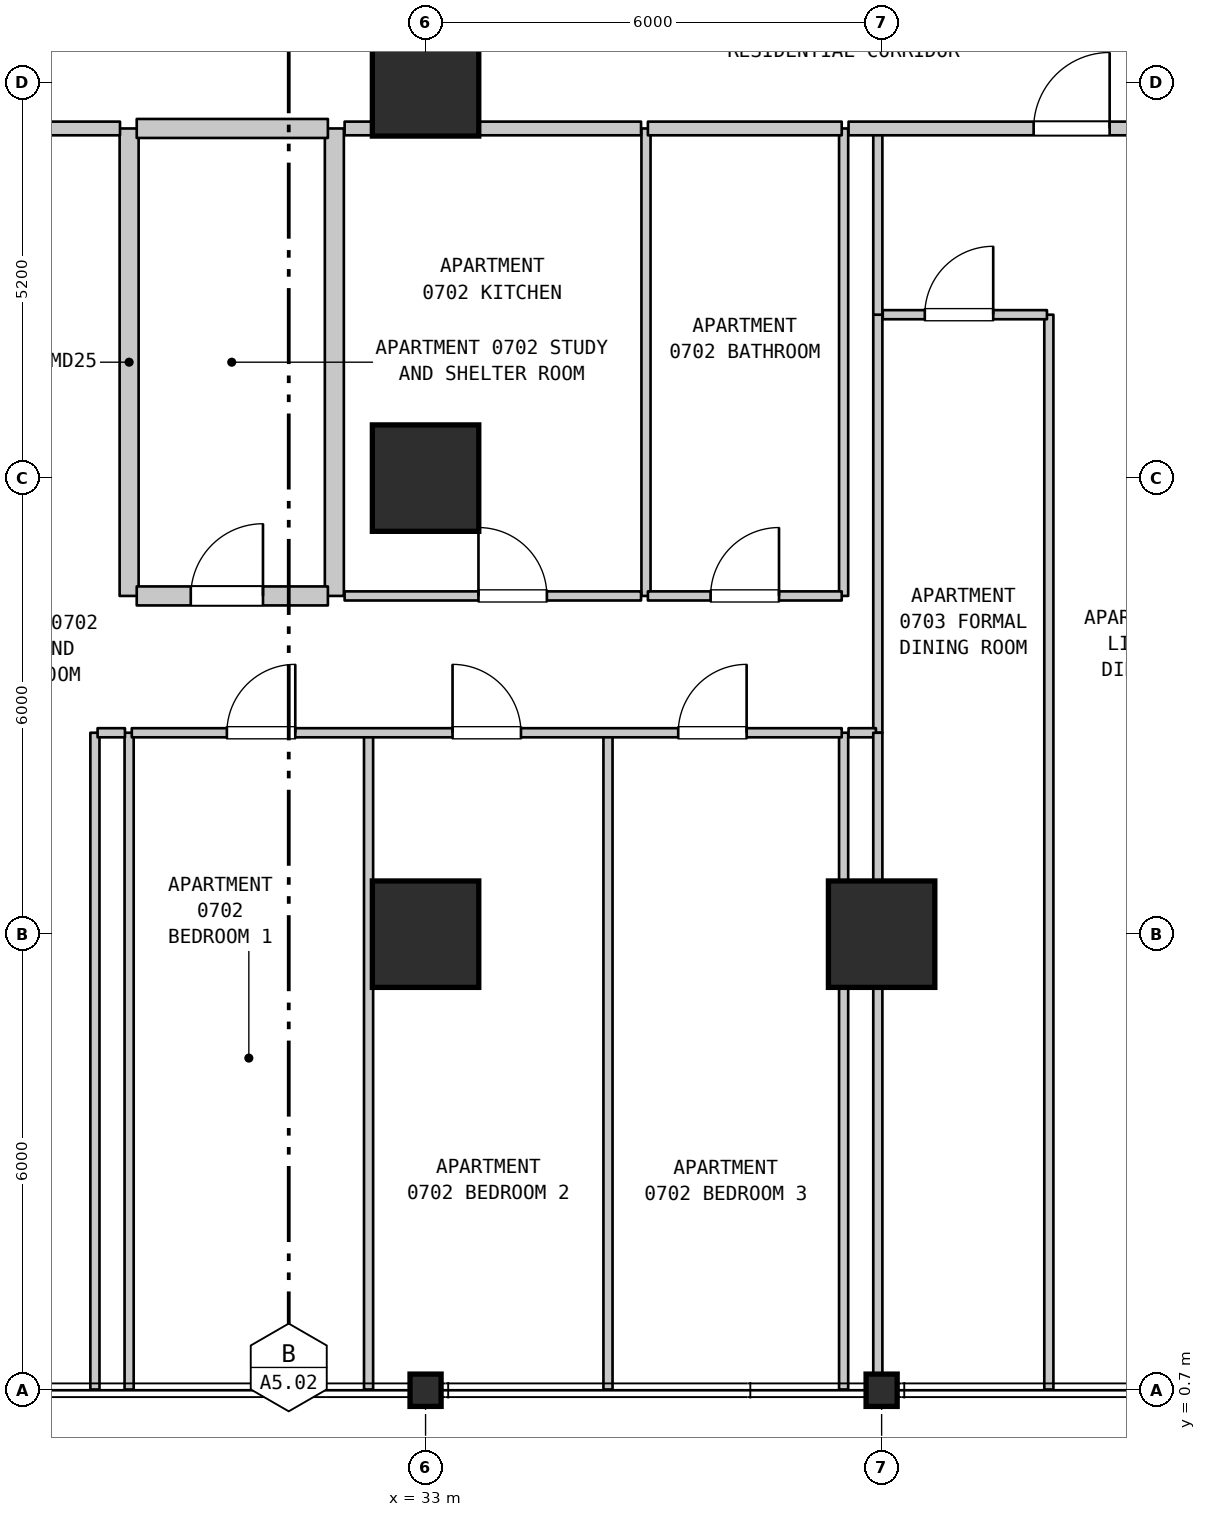
"""IFC4 building model, lengths in metres.
Left out: names, types, materials, properties, quantities, classifications, styles, units other than length and angle.
Written with IfcOpenShell. Run it as: python <this file> out.ifc"""

import sys

from ifc_helpers import new_model, si_unit, direction, frame, frame_2d, origin, origin_2d, place, context, subcontext, project, spatial, rectangle, i_section, extrude, element, fill, save


model = new_model("IFC4")
c1 = context("Model", 3, precision=1e-05, world=origin(), true_north=direction((0.0, 1.0)))
c2 = subcontext(c1, "Body", "Model", "MODEL_VIEW")
j1 = project(units=[si_unit("LENGTHUNIT", "METRE"), si_unit("PLANEANGLEUNIT", "RADIAN")], contexts=[c1])
p1 = place(None, origin())
s1 = spatial("IfcSite", under=j1, at=p1, CompositionType="ELEMENT")
p2 = place(p1, origin())
s2 = spatial("IfcBuilding", under=s1, at=p2, CompositionType="ELEMENT")
p3 = place(p2, frame((0.0, 0.0, 35.1)))
s3 = spatial("IfcBuildingStorey", under=s2, at=p3, CompositionType="ELEMENT", Elevation=35.1)
p4 = place(p3, frame((33.0, 0.7, 0.0), z_axis=(0.0, 0.0, 1.0), x_axis=(1.0, 0.0, 0.0)))
e1 = element("IfcColumn", 1, at=p4, inside=s3, PredefinedType="COLUMN", context=c2, shape_type="SweptSolid", body=[
    extrude(i_section(OverallWidth=0.409, OverallDepth=0.425, WebThickness=0.032, FlangeThickness=0.052, FilletRadius=0.015, at=origin_2d()), origin(), (0.0, 0.0, 1.0), 3.7),
])
for number, where, z_axis, x_axis in (
    (2, (33.0, 6.7, 0.0), (0.0, 0.0, 1.0), (1.0, 0.0, 0.0)),
    (3, (33.0, 12.7, 0.0), (0.0, 0.0, 1.0), (1.0, 0.0, 0.0)),
    (4, (33.0, 17.9, 0.0), (0.0, 0.0, 1.0), (1.0, 0.0, 0.0)),
):
    element("IfcColumn", number, at=place(p3, frame(where, z_axis=z_axis, x_axis=x_axis)), inside=s3, PredefinedType="COLUMN", context=c2, shape_type="SweptSolid", body=[
        extrude(rectangle(XDim=1.4, YDim=1.4, at=origin_2d()), origin(), (0.0, 0.0, 1.0), 3.7),
    ])
p5 = place(p3, frame((39.0, 0.7, 0.0), z_axis=(0.0, 0.0, 1.0), x_axis=(1.0, 0.0, 0.0)))
e5 = element("IfcColumn", 5, at=p5, inside=s3, PredefinedType="COLUMN", context=c2, shape_type="SweptSolid", body=[
    extrude(i_section(OverallWidth=0.409, OverallDepth=0.425, WebThickness=0.032, FlangeThickness=0.052, FilletRadius=0.015, at=origin_2d()), origin(), (0.0, 0.0, 1.0), 3.7),
])
p6 = place(p3, frame((39.0, 6.7, 0.0), z_axis=(0.0, 0.0, 1.0), x_axis=(1.0, 0.0, 0.0)))
e6 = element("IfcColumn", 6, at=p6, inside=s3, PredefinedType="COLUMN", context=c2, shape_type="SweptSolid", body=[
    extrude(rectangle(XDim=1.4, YDim=1.4, at=origin_2d()), origin(), (0.0, 0.0, 1.0), 3.7),
])
for number, where, z_axis, x_axis in (
    (7, (28.65, 0.71, 0.0), (0.0, 0.0, 1.0), (0.0, 1.0, 0.0)),
    (8, (29.1, 0.71, 0.0), (0.0, 0.0, 1.0), (0.0, 1.0, 0.0)),
):
    element("IfcWall", number, at=place(p3, frame(where, z_axis=z_axis, x_axis=x_axis)), inside=s3, PredefinedType="PARTITIONING", context=c2, shape_type="SweptSolid", body=[
        extrude(rectangle(XDim=8.64, YDim=0.12, at=frame_2d((4.32, 0.0))), origin(), (0.0, 0.0, 1.0), 3.385),
    ])
for number, where, z_axis, x_axis in (
    (9, (29.1, 11.15, 0.0), (0.0, 0.0, 1.0), (0.0, 1.0, 0.0)),
    (10, (31.8, 11.15, 0.0), (0.0, 0.0, 1.0), (0.0, 1.0, 0.0)),
):
    element("IfcWall", number, at=place(p3, frame(where, z_axis=z_axis, x_axis=x_axis)), inside=s3, PredefinedType="STANDARD", context=c2, shape_type="SweptSolid", body=[
        extrude(rectangle(XDim=6.15, YDim=0.25, at=frame_2d((3.075, 0.0))), origin(), (0.0, 0.0, 1.0), 3.385),
    ])
for number, where, z_axis, x_axis in (
    (11, (32.25, 0.71, 0.0), (0.0, 0.0, 1.0), (0.0, 1.0, 0.0)),
    (12, (35.4, 0.71, 0.0), (0.0, 0.0, 1.0), (0.0, 1.0, 0.0)),
):
    element("IfcWall", number, at=place(p3, frame(where, z_axis=z_axis, x_axis=x_axis)), inside=s3, PredefinedType="PARTITIONING", context=c2, shape_type="SweptSolid", body=[
        extrude(rectangle(XDim=8.64, YDim=0.12, at=frame_2d((4.32, 0.0))), origin(), (0.0, 0.0, 1.0), 3.385),
    ])
p7 = place(p3, frame((35.9, 11.15, 0.0), z_axis=(0.0, 0.0, 1.0), x_axis=(0.0, 1.0, 0.0)))
e13 = element("IfcWall", 13, at=p7, inside=s3, PredefinedType="PARTITIONING", context=c2, shape_type="SweptSolid", body=[
    extrude(rectangle(XDim=6.15, YDim=0.12, at=frame_2d((3.075, 0.0))), origin(), (0.0, 0.0, 1.0), 3.385),
])
p8 = place(p3, frame((38.5, 0.71, 0.0), z_axis=(0.0, 0.0, 1.0), x_axis=(0.0, 1.0, 0.0)))
e14 = element("IfcWall", 14, at=p8, inside=s3, PredefinedType="PARTITIONING", context=c2, shape_type="SweptSolid", body=[
    extrude(rectangle(XDim=8.64, YDim=0.12, at=frame_2d((4.32, 0.0))), origin(), (0.0, 0.0, 1.0), 3.385),
])
p9 = place(p3, frame((38.5, 11.15, 0.0), z_axis=(0.0, 0.0, 1.0), x_axis=(0.0, 1.0, 0.0)))
e15 = element("IfcWall", 15, at=p9, inside=s3, PredefinedType="PARTITIONING", context=c2, shape_type="SweptSolid", body=[
    extrude(rectangle(XDim=6.15, YDim=0.12, at=frame_2d((3.075, 0.0))), origin(), (0.0, 0.0, 1.0), 3.385),
])
p10 = place(p3, frame((38.95, 0.71, 0.0), z_axis=(0.0, 0.0, 1.0), x_axis=(0.0, 1.0, 0.0)))
e16 = element("IfcWall", 16, at=p10, inside=s3, PredefinedType="PARTITIONING", context=c2, shape_type="SweptSolid", body=[
    extrude(rectangle(XDim=5.99, YDim=0.12, at=frame_2d((2.995, 0.0))), origin(), (0.0, 0.0, 1.0), 2.885),
])
p11 = place(p3, frame((38.95, 9.35, 0.0), z_axis=(0.0, 0.0, 1.0), x_axis=(0.0, 1.0, 0.0)))
e17 = element("IfcWall", 17, at=p11, inside=s3, PredefinedType="PARTITIONING", context=c2, shape_type="SweptSolid", body=[
    extrude(rectangle(XDim=5.5, YDim=0.12, at=frame_2d((2.75, 0.0))), origin(), (0.0, 0.0, 1.0), 3.385),
])
p12 = place(p3, frame((38.95, 14.85, 0.0), z_axis=(0.0, 0.0, 1.0), x_axis=(0.0, 1.0, 0.0)))
e18 = element("IfcWall", 18, at=p12, inside=s3, PredefinedType="PARTITIONING", context=c2, shape_type="SweptSolid", body=[
    extrude(rectangle(XDim=2.45, YDim=0.12, at=frame_2d((1.225, 0.0))), origin(), (0.0, 0.0, 1.0), 3.385),
])
p13 = place(p3, frame((41.2, 0.71, 0.0), z_axis=(0.0, 0.0, 1.0), x_axis=(0.0, 1.0, 0.0)))
e19 = element("IfcWall", 19, at=p13, inside=s3, PredefinedType="PARTITIONING", context=c2, shape_type="SweptSolid", body=[
    extrude(rectangle(XDim=14.14, YDim=0.12, at=frame_2d((7.07, 0.0))), origin(), (0.0, 0.0, 1.0), 3.385),
])
p14 = place(p3, frame((28.685, 9.35, 0.0), z_axis=(0.0, 0.0, 1.0), x_axis=(1.0, 0.0, 0.0)))
e20 = element("IfcWall", 20, at=p14, inside=s3, PredefinedType="PARTITIONING", context=c2, shape_type="SweptSolid", body=[
    extrude(rectangle(XDim=0.36, YDim=0.12, at=frame_2d((0.18, 0.0))), origin(), (0.0, 0.0, 1.0), 3.385),
])
p15 = place(p3, frame((29.135, 9.35, 0.0), z_axis=(0.0, 0.0, 1.0), x_axis=(1.0, 0.0, 0.0)))
e21 = element("IfcWall", 21, at=p15, inside=s3, PredefinedType="PARTITIONING", context=c2, shape_type="SweptSolid", body=[
    extrude(rectangle(XDim=9.34, YDim=0.12, at=frame_2d((4.67, 0.0))), origin(), (0.0, 0.0, 1.0), 3.385),
])
p16 = place(p15, frame((1.251, 0.0, 0.0)))
e22 = element("IfcOpeningElement", 22, at=p16, cuts=e21, PredefinedType="OPENING", context=c2, shape_type="SweptSolid", body=[
    extrude(rectangle(XDim=0.9, YDim=2.15, at=frame_2d((0.45, 1.075))), frame((0.0, 0.07, 0.0), z_axis=(0.0, -1.0, 0.0), x_axis=(1.0, 0.0, 0.0)), (0.0, 0.0, 1.0), 0.14),
])
p17 = place(p15, frame((4.22, 0.0, 0.0)))
e23 = element("IfcOpeningElement", 23, at=p17, cuts=e21, PredefinedType="OPENING", context=c2, shape_type="SweptSolid", body=[
    extrude(rectangle(XDim=0.9, YDim=2.15, at=frame_2d((0.45, 1.075))), frame((0.0, 0.07, 0.0), z_axis=(0.0, -1.0, 0.0), x_axis=(1.0, 0.0, 0.0)), (0.0, 0.0, 1.0), 0.14),
])
p18 = place(p15, frame((7.189, 0.0, 0.0)))
e24 = element("IfcOpeningElement", 24, at=p18, cuts=e21, PredefinedType="OPENING", context=c2, shape_type="SweptSolid", body=[
    extrude(rectangle(XDim=0.9, YDim=2.15, at=frame_2d((0.45, 1.075))), frame((0.0, 0.07, 0.0), z_axis=(0.0, -1.0, 0.0), x_axis=(1.0, 0.0, 0.0)), (0.0, 0.0, 1.0), 0.14),
])
p19 = place(p3, frame((38.565, 9.35, 0.0), z_axis=(0.0, 0.0, 1.0), x_axis=(1.0, 0.0, 0.0)))
e25 = element("IfcWall", 25, at=p19, inside=s3, PredefinedType="PARTITIONING", context=c2, shape_type="SweptSolid", body=[
    extrude(rectangle(XDim=0.36, YDim=0.12, at=frame_2d((0.18, 0.0))), origin(), (0.0, 0.0, 1.0), 3.385),
])
p20 = place(p3, frame((29.2, 11.15, 0.0), z_axis=(0.0, 0.0, 1.0), x_axis=(1.0, 0.0, 0.0)))
e26 = element("IfcWall", 26, at=p20, inside=s3, PredefinedType="STANDARD", context=c2, shape_type="SweptSolid", body=[
    extrude(rectangle(XDim=2.515, YDim=0.25, at=frame_2d((1.258, 0.0))), origin(), (0.0, 0.0, 1.0), 3.385),
])
p21 = place(p20, frame((0.711, 0.0, 0.0)))
e27 = element("IfcOpeningElement", 27, at=p21, cuts=e26, PredefinedType="OPENING", context=c2, shape_type="SweptSolid", body=[
    extrude(rectangle(XDim=0.95, YDim=2.15, at=frame_2d((0.475, 1.075))), frame((0.0, 0.135, 0.0), z_axis=(0.0, -1.0, 0.0), x_axis=(1.0, 0.0, 0.0)), (0.0, 0.0, 1.0), 0.27),
])
p22 = place(p3, frame((31.935, 11.15, 0.0), z_axis=(0.0, 0.0, 1.0), x_axis=(1.0, 0.0, 0.0)))
e28 = element("IfcWall", 28, at=p22, inside=s3, PredefinedType="PARTITIONING", context=c2, shape_type="SweptSolid", body=[
    extrude(rectangle(XDim=3.9, YDim=0.12, at=frame_2d((1.95, 0.0))), origin(), (0.0, 0.0, 1.0), 3.385),
])
p23 = place(p22, frame((1.761, 0.0, 0.0)))
e29 = element("IfcOpeningElement", 29, at=p23, cuts=e28, PredefinedType="OPENING", context=c2, shape_type="SweptSolid", body=[
    extrude(rectangle(XDim=0.9, YDim=2.15, at=frame_2d((0.45, 1.075))), frame((0.0, 0.07, 0.0), z_axis=(0.0, -1.0, 0.0), x_axis=(1.0, 0.0, 0.0)), (0.0, 0.0, 1.0), 0.14),
])
p24 = place(p3, frame((35.925, 11.15, 0.0), z_axis=(0.0, 0.0, 1.0), x_axis=(1.0, 0.0, 0.0)))
e30 = element("IfcWall", 30, at=p24, inside=s3, PredefinedType="PARTITIONING", context=c2, shape_type="SweptSolid", body=[
    extrude(rectangle(XDim=2.55, YDim=0.12, at=frame_2d((1.275, 0.0))), origin(), (0.0, 0.0, 1.0), 3.385),
])
p25 = place(p24, frame((0.825, 0.0, 0.0)))
e31 = element("IfcOpeningElement", 31, at=p25, cuts=e30, PredefinedType="OPENING", context=c2, shape_type="SweptSolid", body=[
    extrude(rectangle(XDim=0.9, YDim=2.1, at=frame_2d((0.45, 1.05))), frame((0.0, 0.07, 0.0), z_axis=(0.0, -1.0, 0.0), x_axis=(1.0, 0.0, 0.0)), (0.0, 0.0, 1.0), 0.14),
])
p26 = place(p3, frame((39.015, 14.85, 0.0), z_axis=(0.0, 0.0, 1.0), x_axis=(1.0, 0.0, 0.0)))
e32 = element("IfcWall", 32, at=p26, inside=s3, PredefinedType="PARTITIONING", context=c2, shape_type="SweptSolid", body=[
    extrude(rectangle(XDim=2.16, YDim=0.12, at=frame_2d((1.08, 0.0))), origin(), (0.0, 0.0, 1.0), 3.385),
])
p27 = place(p26, frame((0.553, 0.0, 0.0)))
e33 = element("IfcOpeningElement", 33, at=p27, cuts=e32, PredefinedType="OPENING", context=c2, shape_type="SweptSolid", body=[
    extrude(rectangle(XDim=0.9, YDim=2.15, at=frame_2d((0.45, 1.075))), frame((0.0, 0.07, 0.0), z_axis=(0.0, -1.0, 0.0), x_axis=(1.0, 0.0, 0.0)), (0.0, 0.0, 1.0), 0.14),
])
p28 = place(p3, frame((23.885, 17.3, 0.0), z_axis=(0.0, 0.0, 1.0), x_axis=(1.0, 0.0, 0.0)))
e34 = element("IfcWall", 34, at=p28, inside=s3, PredefinedType="STANDARD", context=c2, shape_type="SweptSolid", body=[
    extrude(rectangle(XDim=5.095, YDim=0.18, at=frame_2d((2.547, 0.0))), origin(), (0.0, 0.0, 1.0), 3.385),
])
p29 = place(p28, frame((2.08, 0.0, 0.0)))
e35 = element("IfcOpeningElement", 35, at=p29, cuts=e34, PredefinedType="OPENING", context=c2, shape_type="SweptSolid", body=[
    extrude(rectangle(XDim=1.0, YDim=2.15, at=frame_2d((0.5, 1.075))), frame((0.0, 0.1, 0.0), z_axis=(0.0, -1.0, 0.0), x_axis=(1.0, 0.0, 0.0)), (0.0, 0.0, 1.0), 0.2),
])
p30 = place(p3, frame((29.2, 17.3, 0.0), z_axis=(0.0, 0.0, 1.0), x_axis=(1.0, 0.0, 0.0)))
e36 = element("IfcWall", 36, at=p30, inside=s3, PredefinedType="STANDARD", context=c2, shape_type="SweptSolid", body=[
    extrude(rectangle(XDim=2.515, YDim=0.25, at=frame_2d((1.258, 0.0))), origin(), (0.0, 0.0, 1.0), 3.385),
])
p31 = place(p3, frame((31.935, 17.3, 0.0), z_axis=(0.0, 0.0, 1.0), x_axis=(1.0, 0.0, 0.0)))
e37 = element("IfcWall", 37, at=p31, inside=s3, PredefinedType="STANDARD", context=c2, shape_type="SweptSolid", body=[
    extrude(rectangle(XDim=3.9, YDim=0.18, at=frame_2d((1.95, 0.0))), origin(), (0.0, 0.0, 1.0), 3.385),
])
p32 = place(p3, frame((35.925, 17.3, 0.0), z_axis=(0.0, 0.0, 1.0), x_axis=(1.0, 0.0, 0.0)))
e38 = element("IfcWall", 38, at=p32, inside=s3, PredefinedType="STANDARD", context=c2, shape_type="SweptSolid", body=[
    extrude(rectangle(XDim=2.55, YDim=0.18, at=frame_2d((1.275, 0.0))), origin(), (0.0, 0.0, 1.0), 3.385),
])
p33 = place(p3, frame((38.565, 17.3, 0.0), z_axis=(0.0, 0.0, 1.0), x_axis=(1.0, 0.0, 0.0)))
e39 = element("IfcWall", 39, at=p33, inside=s3, PredefinedType="STANDARD", context=c2, shape_type="SweptSolid", body=[
    extrude(rectangle(XDim=5.545, YDim=0.18, at=frame_2d((2.772, 0.0))), origin(), (0.0, 0.0, 1.0), 3.385),
])
p34 = place(p33, frame((2.435, 0.0, 0.0)))
e40 = element("IfcOpeningElement", 40, at=p34, cuts=e39, PredefinedType="OPENING", context=c2, shape_type="SweptSolid", body=[
    extrude(rectangle(XDim=1.0, YDim=2.15, at=frame_2d((0.5, 1.075))), frame((0.0, 0.1, 0.0), z_axis=(0.0, -1.0, 0.0), x_axis=(1.0, 0.0, 0.0)), (0.0, 0.0, 1.0), 0.2),
])
p35 = place(p3, frame((38.95, 6.7, 0.0), z_axis=(0.0, 0.0, 1.0), x_axis=(0.0, 1.0, 0.0)))
e41 = element("IfcWall", 41, at=p35, inside=s3, PredefinedType="PARTITIONING", context=c2, shape_type="SweptSolid", body=[
    extrude(rectangle(XDim=2.65, YDim=0.12, at=frame_2d((1.325, 0.0))), origin(), (0.0, 0.0, 1.0), 3.385),
])
p36 = place(p16, origin())
e42 = element("IfcDoor", 42, at=p36, inside=s3, OperationType="SINGLE_SWING_RIGHT", PredefinedType="DOOR", context=c2, shape_type="SweptSolid", body=[
    extrude(rectangle(XDim=0.9, YDim=2.15, at=frame_2d((0.45, 1.075))), frame((0.0, 0.025, 0.0), z_axis=(0.0, -1.0, 0.0), x_axis=(1.0, 0.0, 0.0)), (0.0, 0.0, 1.0), 0.05),
])
fill(e22, e42)
p37 = place(p17, origin())
e43 = element("IfcDoor", 43, at=p37, inside=s3, OperationType="SINGLE_SWING_LEFT", PredefinedType="DOOR", context=c2, shape_type="SweptSolid", body=[
    extrude(rectangle(XDim=0.9, YDim=2.15, at=frame_2d((0.45, 1.075))), frame((0.0, 0.025, 0.0), z_axis=(0.0, -1.0, 0.0), x_axis=(1.0, 0.0, 0.0)), (0.0, 0.0, 1.0), 0.05),
])
fill(e23, e43)
p38 = place(p18, origin())
e44 = element("IfcDoor", 44, at=p38, inside=s3, OperationType="SINGLE_SWING_RIGHT", PredefinedType="DOOR", context=c2, shape_type="SweptSolid", body=[
    extrude(rectangle(XDim=0.9, YDim=2.15, at=frame_2d((0.45, 1.075))), frame((0.0, 0.025, 0.0), z_axis=(0.0, -1.0, 0.0), x_axis=(1.0, 0.0, 0.0)), (0.0, 0.0, 1.0), 0.05),
])
fill(e24, e44)
p39 = place(p21, origin())
e45 = element("IfcDoor", 45, at=p39, inside=s3, OperationType="SINGLE_SWING_RIGHT", PredefinedType="DOOR", context=c2, shape_type="SweptSolid", body=[
    extrude(rectangle(XDim=0.95, YDim=2.15, at=frame_2d((0.475, 1.075))), frame((0.0, 0.025, 0.0), z_axis=(0.0, -1.0, 0.0), x_axis=(1.0, 0.0, 0.0)), (0.0, 0.0, 1.0), 0.05),
])
fill(e27, e45)
p40 = place(p23, origin())
e46 = element("IfcDoor", 46, at=p40, inside=s3, OperationType="SINGLE_SWING_LEFT", PredefinedType="DOOR", context=c2, shape_type="SweptSolid", body=[
    extrude(rectangle(XDim=0.9, YDim=2.15, at=frame_2d((0.45, 1.075))), frame((0.0, 0.025, 0.0), z_axis=(0.0, -1.0, 0.0), x_axis=(1.0, 0.0, 0.0)), (0.0, 0.0, 1.0), 0.05),
])
fill(e29, e46)
p41 = place(p25, origin())
e47 = element("IfcDoor", 47, at=p41, inside=s3, OperationType="SINGLE_SWING_RIGHT", PredefinedType="DOOR", context=c2, shape_type="SweptSolid", body=[
    extrude(rectangle(XDim=0.9, YDim=2.1, at=frame_2d((0.45, 1.05))), frame((0.0, 0.025, 0.0), z_axis=(0.0, -1.0, 0.0), x_axis=(1.0, 0.0, 0.0)), (0.0, 0.0, 1.0), 0.05),
])
fill(e31, e47)
p42 = place(p27, origin())
e48 = element("IfcDoor", 48, at=p42, inside=s3, OperationType="SINGLE_SWING_RIGHT", PredefinedType="DOOR", context=c2, shape_type="SweptSolid", body=[
    extrude(rectangle(XDim=0.9, YDim=2.15, at=frame_2d((0.45, 1.075))), frame((0.0, 0.025, 0.0), z_axis=(0.0, -1.0, 0.0), x_axis=(1.0, 0.0, 0.0)), (0.0, 0.0, 1.0), 0.05),
])
fill(e33, e48)
p43 = place(p34, origin())
e49 = element("IfcDoor", 49, at=p43, inside=s3, OperationType="SINGLE_SWING_RIGHT", PredefinedType="DOOR", context=c2, shape_type="SweptSolid", body=[
    extrude(rectangle(XDim=1.0, YDim=2.15, at=frame_2d((0.5, 1.075))), frame((0.0, 0.025, 0.0), z_axis=(0.0, -1.0, 0.0), x_axis=(1.0, 0.0, 0.0)), (0.0, 0.0, 1.0), 0.05),
])
fill(e40, e49)
save(model, sys.argv[1])
